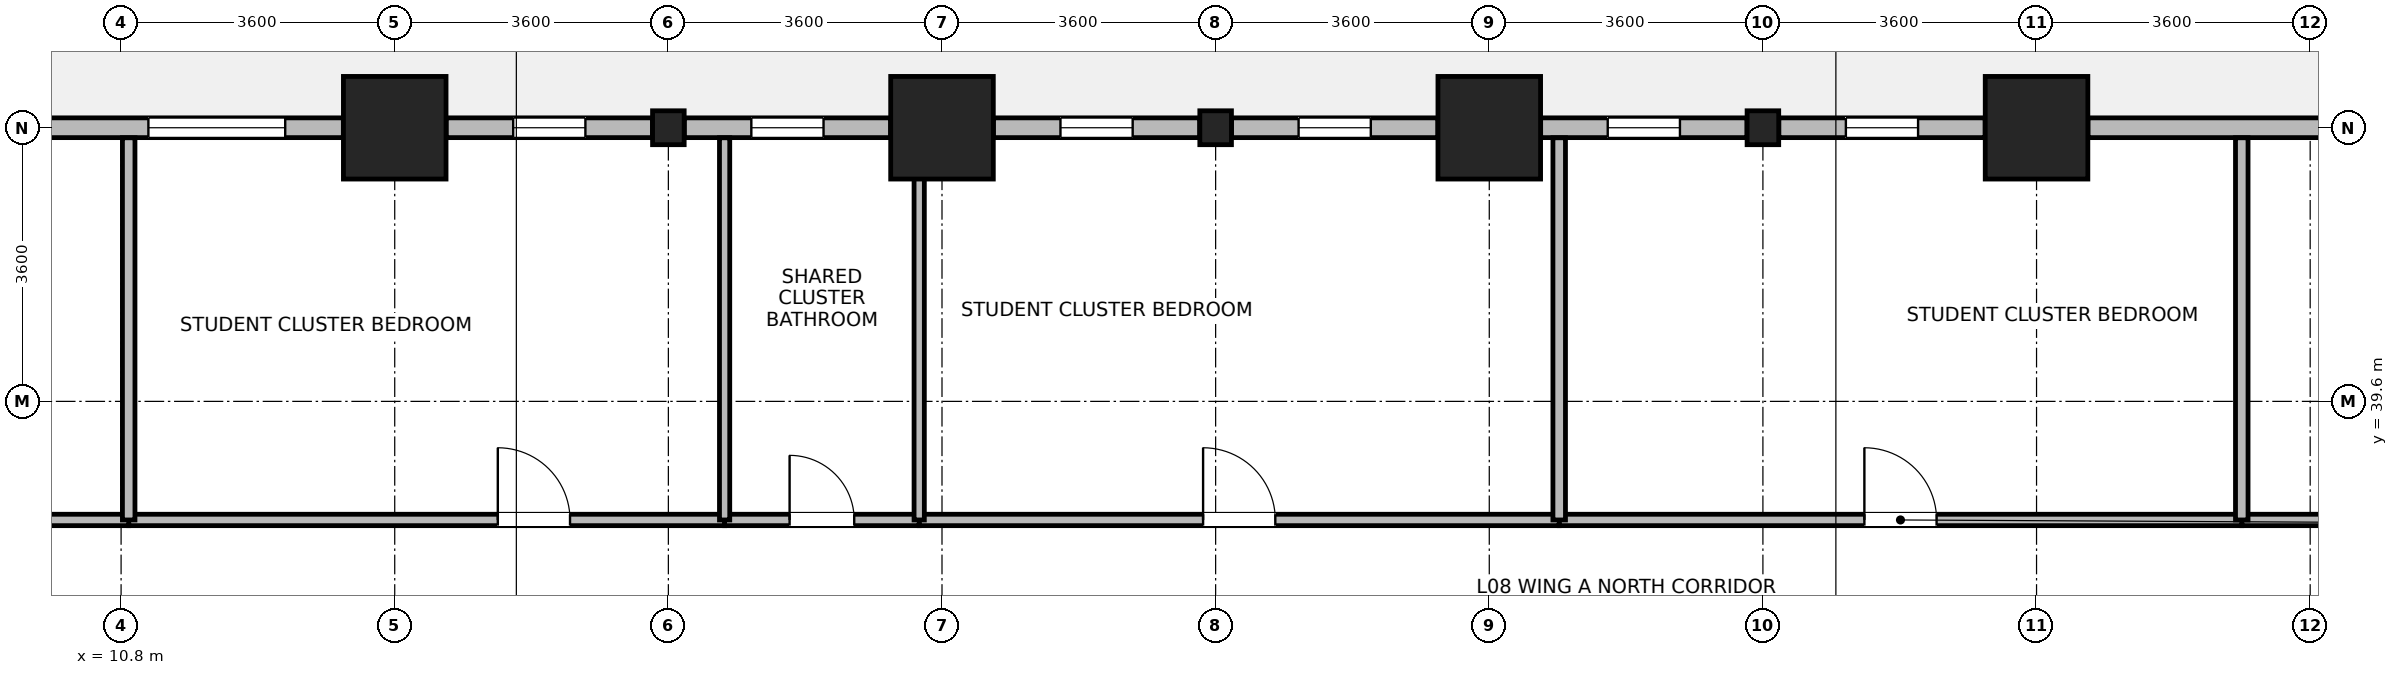
"""IFC4 building model, lengths in metres.
Left out: names, types, materials, properties, quantities, classifications, styles, units other than length and angle.
Written with IfcOpenShell. Run it as: python <this file> out.ifc"""

import sys

from ifc_helpers import new_model, si_unit, direction, frame, frame_2d, origin, origin_2d, place, context, subcontext, project, spatial, rectangle, i_section, extrude, source, transform, mapped, element, fill, save


model = new_model("IFC4")
c1 = context("Model", 3, precision=1e-05, world=origin(), true_north=direction((0.0, 1.0)))
c2 = subcontext(c1, "Body", "Model", "MODEL_VIEW")
j1 = project(units=[si_unit("LENGTHUNIT", "METRE"), si_unit("PLANEANGLEUNIT", "RADIAN")], contexts=[c1])
p1 = place(None, origin())
s1 = spatial("IfcSite", under=j1, at=p1, CompositionType="ELEMENT")
p2 = place(p1, origin())
s2 = spatial("IfcBuilding", under=s1, at=p2, CompositionType="ELEMENT")
p3 = place(p2, frame((0.0, 0.0, 36.4)))
s3 = spatial("IfcBuildingStorey", under=s2, at=p3, CompositionType="ELEMENT", Elevation=36.4)
m1 = source(origin(), c2, "Body", "SweptSolid", [
    extrude(rectangle(XDim=1.35, YDim=1.35, at=origin_2d()), origin(), (0.0, 0.0, 1.0), 3.7),
])
for number, where, z_axis, x_axis in (
    (1, (14.4, 43.2, 0.0), (0.0, 0.0, 1.0), (1.0, 0.0, 0.0)),
    (2, (21.6, 43.2, 0.0), (0.0, 0.0, 1.0), (1.0, 0.0, 0.0)),
    (3, (28.8, 43.2, 0.0), (0.0, 0.0, 1.0), (1.0, 0.0, 0.0)),
    (4, (36.0, 43.2, 0.0), (0.0, 0.0, 1.0), (1.0, 0.0, 0.0)),
):
    element("IfcColumn", number, at=place(p3, frame(where, z_axis=z_axis, x_axis=x_axis)), inside=s3, PredefinedType="COLUMN", context=c2, shape_type="MappedRepresentation", body=[
        mapped(m1, transform((0.0, 0.0, 0.0), x_axis=(1.0, 0.0, 0.0), y_axis=(0.0, 1.0, 0.0), z_axis=(0.0, 0.0, 1.0), scale=1.0)),
    ])
m2 = source(origin(), c2, "Body", "SweptSolid", [
    extrude(i_section(OverallWidth=0.416, OverallDepth=0.446, WebThickness=0.029, FlangeThickness=0.04, FilletRadius=0.015, at=origin_2d()), origin(), (0.0, 0.0, 1.0), 3.7),
])
for number, where, z_axis, x_axis in (
    (5, (18.0, 43.2, 0.0), (0.0, 0.0, 1.0), (1.0, 0.0, 0.0)),
    (6, (25.2, 43.2, 0.0), (0.0, 0.0, 1.0), (1.0, 0.0, 0.0)),
    (7, (32.4, 43.2, 0.0), (0.0, 0.0, 1.0), (1.0, 0.0, 0.0)),
):
    element("IfcColumn", number, at=place(p3, frame(where, z_axis=z_axis, x_axis=x_axis)), inside=s3, PredefinedType="COLUMN", context=c2, shape_type="MappedRepresentation", body=[
        mapped(m2, transform((0.0, 0.0, 0.0), x_axis=(1.0, 0.0, 0.0), y_axis=(0.0, 1.0, 0.0), z_axis=(0.0, 0.0, 1.0), scale=1.0)),
    ])
p4 = place(p3, frame((36.676, 43.2, 0.0), z_axis=(0.0, 0.0, 1.0), x_axis=(1.0, 0.0, 0.0)))
e8 = element("IfcWall", 8, at=p4, inside=s3, PredefinedType="STANDARD", context=c2, shape_type="SweptSolid", body=[
    extrude(rectangle(XDim=9.448, YDim=0.26, at=frame_2d((4.724, 0.0))), origin(), (0.0, 0.0, 1.0), 2.93),
])
p5 = place(p4, frame((3.824, 0.0, 0.85)))
e9 = element("IfcOpeningElement", 9, at=p5, cuts=e8, PredefinedType="OPENING", context=c2, shape_type="SweptSolid", body=[
    extrude(rectangle(XDim=1.8, YDim=1.85, at=frame_2d((0.9, 0.925))), frame((0.0, 0.14, 0.0), z_axis=(0.0, -1.0, 0.0), x_axis=(1.0, 0.0, 0.0)), (0.0, 0.0, 1.0), 0.28),
])
p6 = place(p4, frame((6.973, 0.0, 0.85)))
e10 = element("IfcOpeningElement", 10, at=p6, cuts=e8, PredefinedType="OPENING", context=c2, shape_type="SweptSolid", body=[
    extrude(rectangle(XDim=1.8, YDim=1.85, at=frame_2d((0.9, 0.925))), frame((0.0, 0.14, 0.0), z_axis=(0.0, -1.0, 0.0), x_axis=(1.0, 0.0, 0.0)), (0.0, 0.0, 1.0), 0.28),
])
p7 = place(p3, frame((32.609, 43.2, 0.0), z_axis=(0.0, 0.0, 1.0), x_axis=(1.0, 0.0, 0.0)))
e11 = element("IfcWall", 11, at=p7, inside=s3, PredefinedType="STANDARD", context=c2, shape_type="SweptSolid", body=[
    extrude(rectangle(XDim=2.715, YDim=0.26, at=frame_2d((1.357, 0.0))), origin(), (0.0, 0.0, 1.0), 2.93),
])
p8 = place(p7, frame((0.883, 0.0, 0.85)))
e12 = element("IfcOpeningElement", 12, at=p8, cuts=e11, PredefinedType="OPENING", context=c2, shape_type="SweptSolid", body=[
    extrude(rectangle(XDim=0.95, YDim=1.75, at=frame_2d((0.475, 0.875))), frame((0.0, 0.14, 0.0), z_axis=(0.0, -1.0, 0.0), x_axis=(1.0, 0.0, 0.0)), (0.0, 0.0, 1.0), 0.28),
])
p9 = place(p3, frame((29.476, 43.2, 0.0), z_axis=(0.0, 0.0, 1.0), x_axis=(1.0, 0.0, 0.0)))
e13 = element("IfcWall", 13, at=p9, inside=s3, PredefinedType="STANDARD", context=c2, shape_type="SweptSolid", body=[
    extrude(rectangle(XDim=2.715, YDim=0.26, at=frame_2d((1.357, 0.0))), origin(), (0.0, 0.0, 1.0), 2.93),
])
p10 = place(p9, frame((0.883, 0.0, 0.85)))
e14 = element("IfcOpeningElement", 14, at=p10, cuts=e13, PredefinedType="OPENING", context=c2, shape_type="SweptSolid", body=[
    extrude(rectangle(XDim=0.95, YDim=1.75, at=frame_2d((0.475, 0.875))), frame((0.0, 0.14, 0.0), z_axis=(0.0, -1.0, 0.0), x_axis=(1.0, 0.0, 0.0)), (0.0, 0.0, 1.0), 0.28),
])
p11 = place(p3, frame((25.409, 43.2, 0.0), z_axis=(0.0, 0.0, 1.0), x_axis=(1.0, 0.0, 0.0)))
e15 = element("IfcWall", 15, at=p11, inside=s3, PredefinedType="STANDARD", context=c2, shape_type="SweptSolid", body=[
    extrude(rectangle(XDim=2.715, YDim=0.26, at=frame_2d((1.357, 0.0))), origin(), (0.0, 0.0, 1.0), 2.93),
])
p12 = place(p11, frame((0.883, 0.0, 0.85)))
e16 = element("IfcOpeningElement", 16, at=p12, cuts=e15, PredefinedType="OPENING", context=c2, shape_type="SweptSolid", body=[
    extrude(rectangle(XDim=0.95, YDim=1.75, at=frame_2d((0.475, 0.875))), frame((0.0, 0.14, 0.0), z_axis=(0.0, -1.0, 0.0), x_axis=(1.0, 0.0, 0.0)), (0.0, 0.0, 1.0), 0.28),
])
p13 = place(p3, frame((22.276, 43.2, 0.0), z_axis=(0.0, 0.0, 1.0), x_axis=(1.0, 0.0, 0.0)))
e17 = element("IfcWall", 17, at=p13, inside=s3, PredefinedType="STANDARD", context=c2, shape_type="SweptSolid", body=[
    extrude(rectangle(XDim=2.715, YDim=0.26, at=frame_2d((1.357, 0.0))), origin(), (0.0, 0.0, 1.0), 2.93),
])
p14 = place(p13, frame((0.883, 0.0, 0.85)))
e18 = element("IfcOpeningElement", 18, at=p14, cuts=e17, PredefinedType="OPENING", context=c2, shape_type="SweptSolid", body=[
    extrude(rectangle(XDim=0.95, YDim=1.75, at=frame_2d((0.475, 0.875))), frame((0.0, 0.14, 0.0), z_axis=(0.0, -1.0, 0.0), x_axis=(1.0, 0.0, 0.0)), (0.0, 0.0, 1.0), 0.28),
])
p15 = place(p3, frame((18.209, 43.2, 0.0), z_axis=(0.0, 0.0, 1.0), x_axis=(1.0, 0.0, 0.0)))
e19 = element("IfcWall", 19, at=p15, inside=s3, PredefinedType="STANDARD", context=c2, shape_type="SweptSolid", body=[
    extrude(rectangle(XDim=2.715, YDim=0.26, at=frame_2d((1.357, 0.0))), origin(), (0.0, 0.0, 1.0), 2.93),
])
p16 = place(p15, frame((0.883, 0.0, 0.85)))
e20 = element("IfcOpeningElement", 20, at=p16, cuts=e19, PredefinedType="OPENING", context=c2, shape_type="SweptSolid", body=[
    extrude(rectangle(XDim=0.95, YDim=1.75, at=frame_2d((0.475, 0.875))), frame((0.0, 0.14, 0.0), z_axis=(0.0, -1.0, 0.0), x_axis=(1.0, 0.0, 0.0)), (0.0, 0.0, 1.0), 0.28),
])
p17 = place(p3, frame((15.076, 43.2, 0.0), z_axis=(0.0, 0.0, 1.0), x_axis=(1.0, 0.0, 0.0)))
e21 = element("IfcWall", 21, at=p17, inside=s3, PredefinedType="STANDARD", context=c2, shape_type="SweptSolid", body=[
    extrude(rectangle(XDim=2.715, YDim=0.26, at=frame_2d((1.357, 0.0))), origin(), (0.0, 0.0, 1.0), 2.93),
])
p18 = place(p17, frame((0.883, 0.0, 0.85)))
e22 = element("IfcOpeningElement", 22, at=p18, cuts=e21, PredefinedType="OPENING", context=c2, shape_type="SweptSolid", body=[
    extrude(rectangle(XDim=0.95, YDim=1.75, at=frame_2d((0.475, 0.875))), frame((0.0, 0.14, 0.0), z_axis=(0.0, -1.0, 0.0), x_axis=(1.0, 0.0, 0.0)), (0.0, 0.0, 1.0), 0.28),
])
p19 = place(p3, frame((3.735, 43.2, 0.0), z_axis=(0.0, 0.0, 1.0), x_axis=(1.0, 0.0, 0.0)))
e23 = element("IfcWall", 23, at=p19, inside=s3, PredefinedType="STANDARD", context=c2, shape_type="SweptSolid", body=[
    extrude(rectangle(XDim=9.989, YDim=0.26, at=frame_2d((4.995, 0.0))), origin(), (0.0, 0.0, 1.0), 3.43),
])
p20 = place(p19, frame((0.765, 0.0, 0.85)))
e24 = element("IfcOpeningElement", 24, at=p20, cuts=e23, PredefinedType="OPENING", context=c2, shape_type="SweptSolid", body=[
    extrude(rectangle(XDim=1.8, YDim=1.85, at=frame_2d((0.9, 0.925))), frame((0.0, 0.14, 0.0), z_axis=(0.0, -1.0, 0.0), x_axis=(1.0, 0.0, 0.0)), (0.0, 0.0, 1.0), 0.28),
])
p21 = place(p19, frame((4.094, 0.0, 0.85)))
e25 = element("IfcOpeningElement", 25, at=p21, cuts=e23, PredefinedType="OPENING", context=c2, shape_type="SweptSolid", body=[
    extrude(rectangle(XDim=1.8, YDim=1.85, at=frame_2d((0.9, 0.925))), frame((0.0, 0.14, 0.0), z_axis=(0.0, -1.0, 0.0), x_axis=(1.0, 0.0, 0.0)), (0.0, 0.0, 1.0), 0.28),
])
p22 = place(p19, frame((7.424, 0.0, 0.85)))
e26 = element("IfcOpeningElement", 26, at=p22, cuts=e23, PredefinedType="OPENING", context=c2, shape_type="SweptSolid", body=[
    extrude(rectangle(XDim=1.8, YDim=1.85, at=frame_2d((0.9, 0.925))), frame((0.0, 0.14, 0.0), z_axis=(0.0, -1.0, 0.0), x_axis=(1.0, 0.0, 0.0)), (0.0, 0.0, 1.0), 0.28),
])
p23 = place(p3, frame((38.7, 38.04, 0.0), z_axis=(0.0, 0.0, 1.0), x_axis=(1.0, 0.0, 0.0)))
e27 = element("IfcWall", 27, at=p23, inside=s3, PredefinedType="PARTITIONING", context=c2, shape_type="SweptSolid", body=[
    extrude(rectangle(XDim=17.06, YDim=0.15, at=frame_2d((8.53, 0.0))), origin(), (0.0, 0.0, 1.0), 3.43),
])
p24 = place(p23, frame((6.374, 0.0, 0.0)))
e28 = element("IfcOpeningElement", 28, at=p24, cuts=e27, PredefinedType="OPENING", context=c2, shape_type="SweptSolid", body=[
    extrude(rectangle(XDim=0.9, YDim=2.08, at=frame_2d((0.45, 1.04))), frame((0.0, 0.085, 0.0), z_axis=(0.0, -1.0, 0.0), x_axis=(1.0, 0.0, 0.0)), (0.0, 0.0, 1.0), 0.17),
])
p25 = place(p3, frame((29.72, 38.04, 0.0), z_axis=(0.0, 0.0, 1.0), x_axis=(1.0, 0.0, 0.0)))
e29 = element("IfcWall", 29, at=p25, inside=s3, PredefinedType="PARTITIONING", context=c2, shape_type="SweptSolid", body=[
    extrude(rectangle(XDim=8.98, YDim=0.15, at=frame_2d((4.49, 0.0))), origin(), (0.0, 0.0, 1.0), 3.43),
])
p26 = place(p25, frame((4.015, 0.0, 0.0)))
e30 = element("IfcOpeningElement", 30, at=p26, cuts=e29, PredefinedType="OPENING", context=c2, shape_type="SweptSolid", body=[
    extrude(rectangle(XDim=0.95, YDim=2.1, at=frame_2d((0.475, 1.05))), frame((0.0, 0.085, 0.0), z_axis=(0.0, -1.0, 0.0), x_axis=(1.0, 0.0, 0.0)), (0.0, 0.0, 1.0), 0.17),
])
p27 = place(p3, frame((21.3, 38.04, 0.0), z_axis=(0.0, 0.0, 1.0), x_axis=(1.0, 0.0, 0.0)))
e31 = element("IfcWall", 31, at=p27, inside=s3, PredefinedType="PARTITIONING", context=c2, shape_type="SweptSolid", body=[
    extrude(rectangle(XDim=8.42, YDim=0.15, at=frame_2d((4.21, 0.0))), origin(), (0.0, 0.0, 1.0), 3.43),
])
p28 = place(p27, frame((3.735, 0.0, 0.0)))
e32 = element("IfcOpeningElement", 32, at=p28, cuts=e31, PredefinedType="OPENING", context=c2, shape_type="SweptSolid", body=[
    extrude(rectangle(XDim=0.95, YDim=2.1, at=frame_2d((0.475, 1.05))), frame((0.0, 0.085, 0.0), z_axis=(0.0, -1.0, 0.0), x_axis=(1.0, 0.0, 0.0)), (0.0, 0.0, 1.0), 0.17),
])
p29 = place(p3, frame((10.9, 38.04, 0.0), z_axis=(0.0, 0.0, 1.0), x_axis=(1.0, 0.0, 0.0)))
e33 = element("IfcWall", 33, at=p29, inside=s3, PredefinedType="PARTITIONING", context=c2, shape_type="SweptSolid", body=[
    extrude(rectangle(XDim=7.84, YDim=0.15, at=frame_2d((3.92, 0.0))), origin(), (0.0, 0.0, 1.0), 3.43),
])
p30 = place(p29, frame((4.856, 0.0, 0.0)))
e34 = element("IfcOpeningElement", 34, at=p30, cuts=e33, PredefinedType="OPENING", context=c2, shape_type="SweptSolid", body=[
    extrude(rectangle(XDim=0.95, YDim=2.1, at=frame_2d((0.475, 1.05))), frame((0.0, 0.085, 0.0), z_axis=(0.0, -1.0, 0.0), x_axis=(1.0, 0.0, 0.0)), (0.0, 0.0, 1.0), 0.17),
])
p31 = place(p3, frame((3.732, 38.04, 0.0), z_axis=(0.0, 0.0, 1.0), x_axis=(1.0, 0.0, 0.0)))
e35 = element("IfcWall", 35, at=p31, inside=s3, PredefinedType="PARTITIONING", context=c2, shape_type="SweptSolid", body=[
    extrude(rectangle(XDim=7.168, YDim=0.15, at=frame_2d((3.584, 0.0))), origin(), (0.0, 0.0, 1.0), 3.43),
])
p32 = place(p31, frame((4.399, 0.0, 0.0)))
e36 = element("IfcOpeningElement", 36, at=p32, cuts=e35, PredefinedType="OPENING", context=c2, shape_type="SweptSolid", body=[
    extrude(rectangle(XDim=0.95, YDim=2.1, at=frame_2d((0.475, 1.05))), frame((0.0, 0.085, 0.0), z_axis=(0.0, -1.0, 0.0), x_axis=(1.0, 0.0, 0.0)), (0.0, 0.0, 1.0), 0.17),
])
p33 = place(p3, frame((18.74, 38.04, 0.0), z_axis=(0.0, 0.0, 1.0), x_axis=(1.0, 0.0, 0.0)))
e37 = element("IfcWall", 37, at=p33, inside=s3, PredefinedType="PARTITIONING", context=c2, shape_type="SweptSolid", body=[
    extrude(rectangle(XDim=2.56, YDim=0.15, at=frame_2d((1.28, 0.0))), origin(), (0.0, 0.0, 1.0), 3.43),
])
p34 = place(p33, frame((0.855, 0.0, 0.0)))
e38 = element("IfcOpeningElement", 38, at=p34, cuts=e37, PredefinedType="OPENING", context=c2, shape_type="SweptSolid", body=[
    extrude(rectangle(XDim=0.85, YDim=2.04, at=frame_2d((0.425, 1.02))), frame((0.0, 0.085, 0.0), z_axis=(0.0, -1.0, 0.0), x_axis=(1.0, 0.0, 0.0)), (0.0, 0.0, 1.0), 0.17),
])
p35 = place(p3, frame((10.9, 38.04, 0.0), z_axis=(0.0, 0.0, 1.0), x_axis=(0.0, 1.0, 0.0)))
e39 = element("IfcWall", 39, at=p35, inside=s3, PredefinedType="PARTITIONING", context=c2, shape_type="SweptSolid", body=[
    extrude(rectangle(XDim=5.028, YDim=0.165, at=frame_2d((2.514, 0.0))), origin(), (0.0, 0.0, 1.0), 3.43),
])
for number, where, z_axis, x_axis in (
    (40, (18.74, 38.04, 0.0), (0.0, 0.0, 1.0), (0.0, 1.0, 0.0)),
    (41, (21.3, 38.04, 0.0), (0.0, 0.0, 1.0), (0.0, 1.0, 0.0)),
):
    element("IfcWall", number, at=place(p3, frame(where, z_axis=z_axis, x_axis=x_axis)), inside=s3, PredefinedType="PARTITIONING", context=c2, shape_type="SweptSolid", body=[
        extrude(rectangle(XDim=5.028, YDim=0.135, at=frame_2d((2.514, 0.0))), origin(), (0.0, 0.0, 1.0), 3.43),
    ])
for number, where, z_axis, x_axis in (
    (42, (29.72, 38.04, 0.0), (0.0, 0.0, 1.0), (0.0, 1.0, 0.0)),
    (43, (38.7, 38.04, 0.0), (0.0, 0.0, 1.0), (0.0, 1.0, 0.0)),
):
    element("IfcWall", number, at=place(p3, frame(where, z_axis=z_axis, x_axis=x_axis)), inside=s3, PredefinedType="PARTITIONING", context=c2, shape_type="SweptSolid", body=[
        extrude(rectangle(XDim=5.028, YDim=0.165, at=frame_2d((2.514, 0.0))), origin(), (0.0, 0.0, 1.0), 3.43),
    ])
p36 = place(p8, origin())
e44 = element("IfcWindow", 44, at=p36, inside=s3, PartitioningType="SINGLE_PANEL", PredefinedType="WINDOW", context=c2, shape_type="SweptSolid", body=[
    extrude(rectangle(XDim=0.95, YDim=1.75, at=frame_2d((0.475, 0.875))), frame((0.0, 0.03, 0.0), z_axis=(0.0, -1.0, 0.0), x_axis=(1.0, 0.0, 0.0)), (0.0, 0.0, 1.0), 0.06),
])
fill(e12, e44)
p37 = place(p10, origin())
e45 = element("IfcWindow", 45, at=p37, inside=s3, PartitioningType="SINGLE_PANEL", PredefinedType="WINDOW", context=c2, shape_type="SweptSolid", body=[
    extrude(rectangle(XDim=0.95, YDim=1.75, at=frame_2d((0.475, 0.875))), frame((0.0, 0.03, 0.0), z_axis=(0.0, -1.0, 0.0), x_axis=(1.0, 0.0, 0.0)), (0.0, 0.0, 1.0), 0.06),
])
fill(e14, e45)
p38 = place(p12, origin())
e46 = element("IfcWindow", 46, at=p38, inside=s3, PartitioningType="SINGLE_PANEL", PredefinedType="WINDOW", context=c2, shape_type="SweptSolid", body=[
    extrude(rectangle(XDim=0.95, YDim=1.75, at=frame_2d((0.475, 0.875))), frame((0.0, 0.03, 0.0), z_axis=(0.0, -1.0, 0.0), x_axis=(1.0, 0.0, 0.0)), (0.0, 0.0, 1.0), 0.06),
])
fill(e16, e46)
p39 = place(p14, origin())
e47 = element("IfcWindow", 47, at=p39, inside=s3, PartitioningType="SINGLE_PANEL", PredefinedType="WINDOW", context=c2, shape_type="SweptSolid", body=[
    extrude(rectangle(XDim=0.95, YDim=1.75, at=frame_2d((0.475, 0.875))), frame((0.0, 0.03, 0.0), z_axis=(0.0, -1.0, 0.0), x_axis=(1.0, 0.0, 0.0)), (0.0, 0.0, 1.0), 0.06),
])
fill(e18, e47)
p40 = place(p16, origin())
e48 = element("IfcWindow", 48, at=p40, inside=s3, PartitioningType="SINGLE_PANEL", PredefinedType="WINDOW", context=c2, shape_type="SweptSolid", body=[
    extrude(rectangle(XDim=0.95, YDim=1.75, at=frame_2d((0.475, 0.875))), frame((0.0, 0.03, 0.0), z_axis=(0.0, -1.0, 0.0), x_axis=(1.0, 0.0, 0.0)), (0.0, 0.0, 1.0), 0.06),
])
fill(e20, e48)
p41 = place(p18, origin())
e49 = element("IfcWindow", 49, at=p41, inside=s3, PartitioningType="SINGLE_PANEL", PredefinedType="WINDOW", context=c2, shape_type="SweptSolid", body=[
    extrude(rectangle(XDim=0.95, YDim=1.75, at=frame_2d((0.475, 0.875))), frame((0.0, 0.03, 0.0), z_axis=(0.0, -1.0, 0.0), x_axis=(1.0, 0.0, 0.0)), (0.0, 0.0, 1.0), 0.06),
])
fill(e22, e49)
p42 = place(p22, origin())
e50 = element("IfcWindow", 50, at=p42, inside=s3, PartitioningType="SINGLE_PANEL", PredefinedType="WINDOW", context=c2, shape_type="SweptSolid", body=[
    extrude(rectangle(XDim=1.8, YDim=1.85, at=frame_2d((0.9, 0.925))), frame((0.0, 0.03, 0.0), z_axis=(0.0, -1.0, 0.0), x_axis=(1.0, 0.0, 0.0)), (0.0, 0.0, 1.0), 0.06),
])
fill(e26, e50)
p43 = place(p26, origin())
e51 = element("IfcDoor", 51, at=p43, inside=s3, OperationType="SINGLE_SWING_LEFT", PredefinedType="DOOR", context=c2, shape_type="SweptSolid", body=[
    extrude(rectangle(XDim=0.95, YDim=2.1, at=frame_2d((0.475, 1.05))), frame((0.0, 0.025, 0.0), z_axis=(0.0, -1.0, 0.0), x_axis=(1.0, 0.0, 0.0)), (0.0, 0.0, 1.0), 0.05),
])
fill(e30, e51)
p44 = place(p28, origin())
e52 = element("IfcDoor", 52, at=p44, inside=s3, OperationType="SINGLE_SWING_LEFT", PredefinedType="DOOR", context=c2, shape_type="SweptSolid", body=[
    extrude(rectangle(XDim=0.95, YDim=2.1, at=frame_2d((0.475, 1.05))), frame((0.0, 0.025, 0.0), z_axis=(0.0, -1.0, 0.0), x_axis=(1.0, 0.0, 0.0)), (0.0, 0.0, 1.0), 0.05),
])
fill(e32, e52)
p45 = place(p30, origin())
e53 = element("IfcDoor", 53, at=p45, inside=s3, OperationType="SINGLE_SWING_LEFT", PredefinedType="DOOR", context=c2, shape_type="SweptSolid", body=[
    extrude(rectangle(XDim=0.95, YDim=2.1, at=frame_2d((0.475, 1.05))), frame((0.0, 0.025, 0.0), z_axis=(0.0, -1.0, 0.0), x_axis=(1.0, 0.0, 0.0)), (0.0, 0.0, 1.0), 0.05),
])
fill(e34, e53)
p46 = place(p34, origin())
e54 = element("IfcDoor", 54, at=p46, inside=s3, OperationType="SINGLE_SWING_LEFT", PredefinedType="DOOR", context=c2, shape_type="SweptSolid", body=[
    extrude(rectangle(XDim=0.85, YDim=2.04, at=frame_2d((0.425, 1.02))), frame((0.0, 0.025, 0.0), z_axis=(0.0, -1.0, 0.0), x_axis=(1.0, 0.0, 0.0)), (0.0, 0.0, 1.0), 0.05),
])
fill(e38, e54)
save(model, sys.argv[1])
